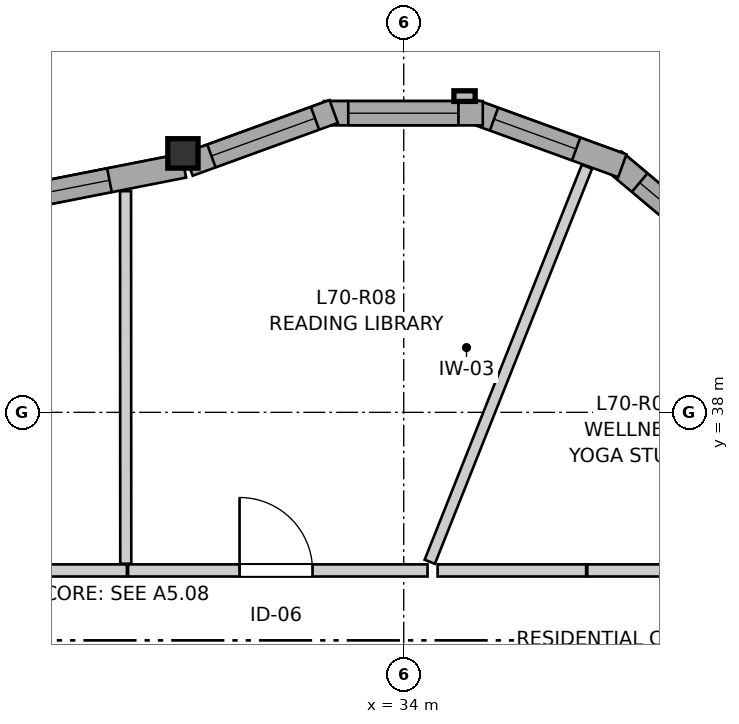
"""IFC4 building model, lengths in metres.
Left out: names, types, materials, properties, quantities, classifications, styles, units other than length and angle.
Written with IfcOpenShell. Run it as: python <this file> out.ifc"""

import sys

from ifc_helpers import new_model, si_unit, direction, frame, frame_2d, origin, origin_2d, place, context, subcontext, project, spatial, rectangle, i_section, extrude, source, transform, mapped, element, fill, save


model = new_model("IFC4")
c1 = context("Model", 3, precision=1e-05, world=origin(), true_north=direction((0.0, 1.0)))
c2 = subcontext(c1, "Body", "Model", "MODEL_VIEW")
j1 = project(units=[si_unit("LENGTHUNIT", "METRE"), si_unit("PLANEANGLEUNIT", "RADIAN")], contexts=[c1])
p1 = place(None, origin())
s1 = spatial("IfcSite", under=j1, at=p1, CompositionType="ELEMENT")
p2 = place(p1, origin())
s2 = spatial("IfcBuilding", under=s1, at=p2, CompositionType="ELEMENT")
p3 = place(p2, frame((0.0, 0.0, 234.0)))
s3 = spatial("IfcBuildingStorey", under=s2, at=p3, CompositionType="ELEMENT", Elevation=234.0)
m1 = source(origin(), c2, "Body", "SweptSolid", [
    extrude(i_section(OverallWidth=0.398, OverallDepth=0.387, WebThickness=0.019, FlangeThickness=0.03, FilletRadius=0.015, at=origin_2d()), origin(), (0.0, 0.0, 1.0), 2.96),
])
p4 = place(p3, frame((31.095, 41.406, 0.0), z_axis=(0.0, 0.0, 1.0), x_axis=(1.0, 0.0, 0.0)))
e1 = element("IfcColumn", 1, at=p4, inside=s3, PredefinedType="PILASTER", context=c2, shape_type="MappedRepresentation", body=[
    mapped(m1, transform((0.0, 0.0, 0.0), x_axis=(1.0, 0.0, 0.0), y_axis=(0.0, 1.0, 0.0), z_axis=(0.0, 0.0, 1.0), scale=1.0)),
])
p5 = place(p3, frame((38.365, 39.965, 0.0), z_axis=(0.0, 0.0, 1.0), x_axis=(-0.766072824549, 0.642753784499, 0.0)))
e2 = element("IfcWall", 2, at=p5, inside=s3, PredefinedType="SOLIDWALL", context=c2, shape_type="SweptSolid", body=[
    extrude(rectangle(XDim=2.091, YDim=0.32, at=frame_2d((1.045, 0.0))), origin(), (0.0, 0.0, 1.0), 2.58),
])
p6 = place(p5, frame((0.445, 0.0, 0.82)))
e3 = element("IfcOpeningElement", 3, at=p6, cuts=e2, PredefinedType="OPENING", context=c2, shape_type="SweptSolid", body=[
    extrude(rectangle(XDim=1.2, YDim=1.45, at=frame_2d((0.6, 0.725))), frame((0.0, 0.17, 0.0), z_axis=(0.0, -1.0, 0.0), x_axis=(1.0, 0.0, 0.0)), (0.0, 0.0, 1.0), 0.34),
])
p7 = place(p3, frame((36.876, 41.243, 0.0), z_axis=(0.0, 0.0, 1.0), x_axis=(-0.93973543134, 0.341902499383, 0.0)))
e4 = element("IfcWall", 4, at=p7, inside=s3, PredefinedType="SOLIDWALL", context=c2, shape_type="SweptSolid", body=[
    extrude(rectangle(XDim=2.09, YDim=0.32, at=frame_2d((1.045, 0.0))), origin(), (0.0, 0.0, 1.0), 2.58),
])
p8 = place(p7, frame((0.646, 0.0, 0.82)))
e5 = element("IfcOpeningElement", 5, at=p8, cuts=e4, PredefinedType="OPENING", context=c2, shape_type="SweptSolid", body=[
    extrude(rectangle(XDim=1.15, YDim=1.2, at=frame_2d((0.575, 0.6))), frame((0.0, 0.17, 0.0), z_axis=(0.0, -1.0, 0.0), x_axis=(1.0, 0.0, 0.0)), (0.0, 0.0, 1.0), 0.34),
])
p9 = place(p3, frame((35.04, 41.936, 0.0), z_axis=(0.0, 0.0, 1.0), x_axis=(-1.0, 0.0, 0.0)))
e6 = element("IfcWall", 6, at=p9, inside=s3, PredefinedType="SOLIDWALL", context=c2, shape_type="SweptSolid", body=[
    extrude(rectangle(XDim=2.091, YDim=0.32, at=frame_2d((1.045, 0.0))), origin(), (0.0, 0.0, 1.0), 2.58),
])
p10 = place(p9, frame((0.32, 0.0, 0.82)))
e7 = element("IfcOpeningElement", 7, at=p10, cuts=e6, PredefinedType="OPENING", context=c2, shape_type="SweptSolid", body=[
    extrude(rectangle(XDim=1.45, YDim=1.25, at=frame_2d((0.725, 0.625))), frame((0.0, 0.17, 0.0), z_axis=(0.0, -1.0, 0.0), x_axis=(1.0, 0.0, 0.0)), (0.0, 0.0, 1.0), 0.34),
])
p11 = place(p3, frame((33.078, 41.958, 0.0), z_axis=(0.0, 0.0, 1.0), x_axis=(-0.939730268502, -0.341916689358, 0.0)))
e8 = element("IfcWall", 8, at=p11, inside=s3, PredefinedType="SOLIDWALL", context=c2, shape_type="SweptSolid", body=[
    extrude(rectangle(XDim=2.032, YDim=0.32, at=frame_2d((1.016, 0.0))), origin(), (0.0, 0.0, 1.0), 2.58),
])
p12 = place(p11, frame((0.261, 0.0, 0.82)))
e9 = element("IfcOpeningElement", 9, at=p12, cuts=e8, PredefinedType="OPENING", context=c2, shape_type="SweptSolid", body=[
    extrude(rectangle(XDim=1.45, YDim=1.25, at=frame_2d((0.725, 0.625))), frame((0.0, 0.17, 0.0), z_axis=(0.0, -1.0, 0.0), x_axis=(1.0, 0.0, 0.0)), (0.0, 0.0, 1.0), 0.34),
])
p13 = place(p3, frame((31.106, 41.246, 0.0), z_axis=(0.0, 0.0, 1.0), x_axis=(-0.981245466498, -0.192762378272, 0.0)))
e10 = element("IfcWall", 10, at=p13, inside=s3, PredefinedType="SOLIDWALL", context=c2, shape_type="SweptSolid", body=[
    extrude(rectangle(XDim=2.213, YDim=0.32, at=frame_2d((1.106, 0.0))), origin(), (0.0, 0.0, 1.0), 2.58),
])
p14 = place(p13, frame((0.997, 0.0, 0.82)))
e11 = element("IfcOpeningElement", 11, at=p14, cuts=e10, PredefinedType="OPENING", context=c2, shape_type="SweptSolid", body=[
    extrude(rectangle(XDim=0.95, YDim=1.35, at=frame_2d((0.475, 0.675))), frame((0.0, 0.17, 0.0), z_axis=(0.0, -1.0, 0.0), x_axis=(1.0, 0.0, 0.0)), (0.0, 0.0, 1.0), 0.34),
])
p15 = place(p3, frame((24.3, 35.92, 0.0), z_axis=(0.0, 0.0, 1.0), x_axis=(1.0, 0.0, 0.0)))
e12 = element("IfcWall", 12, at=p15, inside=s3, PredefinedType="PARTITIONING", context=c2, shape_type="SweptSolid", body=[
    extrude(rectangle(XDim=6.058, YDim=0.16, at=frame_2d((3.029, 0.0))), origin(), (0.0, 0.0, 1.0), 2.96),
])
p16 = place(p15, frame((2.542, 0.0, 0.0)))
e13 = element("IfcOpeningElement", 13, at=p16, cuts=e12, PredefinedType="OPENING", context=c2, shape_type="SweptSolid", body=[
    extrude(rectangle(XDim=0.96, YDim=2.1, at=frame_2d((0.48, 1.05))), frame((0.0, 0.09, 0.0), z_axis=(0.0, -1.0, 0.0), x_axis=(1.0, 0.0, 0.0)), (0.0, 0.0, 1.0), 0.18),
])
p17 = place(p3, frame((30.373, 35.92, 0.0), z_axis=(0.0, 0.0, 1.0), x_axis=(1.0, 0.0, 0.0)))
e14 = element("IfcWall", 14, at=p17, inside=s3, PredefinedType="PARTITIONING", context=c2, shape_type="SweptSolid", body=[
    extrude(rectangle(XDim=3.94, YDim=0.16, at=frame_2d((1.97, 0.0))), origin(), (0.0, 0.0, 1.0), 2.96),
])
p18 = place(p17, frame((1.467, 0.0, 0.0)))
e15 = element("IfcOpeningElement", 15, at=p18, cuts=e14, PredefinedType="OPENING", context=c2, shape_type="SweptSolid", body=[
    extrude(rectangle(XDim=0.96, YDim=2.1, at=frame_2d((0.48, 1.05))), frame((0.0, 0.09, 0.0), z_axis=(0.0, -1.0, 0.0), x_axis=(1.0, 0.0, 0.0)), (0.0, 0.0, 1.0), 0.18),
])
p19 = place(p3, frame((34.343, 36.034, 0.0), z_axis=(0.0, 0.0, 1.0), x_axis=(0.369712016487, 0.92914639582, 0.0)))
e16 = element("IfcWall", 16, at=p19, inside=s3, PredefinedType="PARTITIONING", context=c2, shape_type="SweptSolid", body=[
    extrude(rectangle(XDim=5.594, YDim=0.145, at=frame_2d((2.797, 0.0))), origin(), (0.0, 0.0, 1.0), 2.96),
])
p20 = place(p3, frame((30.34, 40.91, 0.0), z_axis=(0.0, 0.0, 1.0), x_axis=(0.000597668984, -0.999999821396, 0.0)))
e17 = element("IfcWall", 17, at=p20, inside=s3, PredefinedType="PARTITIONING", context=c2, shape_type="SweptSolid", body=[
    extrude(rectangle(XDim=4.902, YDim=0.145, at=frame_2d((2.451, 0.0))), origin(), (0.0, 0.0, 1.0), 2.96),
])
p21 = place(p3, frame((34.446, 35.92, 0.0), z_axis=(0.0, 0.0, 1.0), x_axis=(1.0, 0.0, 0.0)))
e18 = element("IfcWall", 18, at=p21, inside=s3, PredefinedType="PARTITIONING", context=c2, shape_type="SweptSolid", body=[
    extrude(rectangle(XDim=1.954, YDim=0.16, at=frame_2d((0.977, 0.0))), origin(), (0.0, 0.0, 1.0), 2.598),
])
p22 = place(p3, frame((36.415, 35.92, 0.0), z_axis=(0.0, 0.0, 1.0), x_axis=(1.0, 0.0, 0.0)))
e19 = element("IfcWall", 19, at=p22, inside=s3, PredefinedType="PARTITIONING", context=c2, shape_type="SweptSolid", body=[
    extrude(rectangle(XDim=1.605, YDim=0.16, at=frame_2d((0.802, 0.0))), origin(), (0.0, 0.0, 1.0), 2.598),
])
m2 = source(origin(), c2, "Body", "SweptSolid", [
    extrude(rectangle(XDim=1.2, YDim=1.45, at=frame_2d((0.6, 0.725))), frame((0.0, 0.03, 0.0), z_axis=(0.0, -1.0, 0.0), x_axis=(1.0, 0.0, 0.0)), (0.0, 0.0, 1.0), 0.06),
])
p23 = place(p6, origin())
e20 = element("IfcWindow", 20, at=p23, inside=s3, PartitioningType="SINGLE_PANEL", PredefinedType="WINDOW", context=c2, shape_type="MappedRepresentation", body=[
    mapped(m2, transform((0.0, 0.0, 0.0), x_axis=(1.0, 0.0, 0.0), y_axis=(0.0, 1.0, 0.0), z_axis=(0.0, 0.0, 1.0), scale=1.0)),
])
fill(e3, e20)
m3 = source(origin(), c2, "Body", "SweptSolid", [
    extrude(rectangle(XDim=1.15, YDim=1.2, at=frame_2d((0.575, 0.6))), frame((0.0, 0.03, 0.0), z_axis=(0.0, -1.0, 0.0), x_axis=(1.0, 0.0, 0.0)), (0.0, 0.0, 1.0), 0.06),
])
p24 = place(p8, origin())
e21 = element("IfcWindow", 21, at=p24, inside=s3, PartitioningType="SINGLE_PANEL", PredefinedType="WINDOW", context=c2, shape_type="MappedRepresentation", body=[
    mapped(m3, transform((0.0, 0.0, 0.0), x_axis=(1.0, 0.0, 0.0), y_axis=(0.0, 1.0, 0.0), z_axis=(0.0, 0.0, 1.0), scale=1.0)),
])
fill(e5, e21)
m4 = source(origin(), c2, "Body", "SweptSolid", [
    extrude(rectangle(XDim=1.45, YDim=1.25, at=frame_2d((0.725, 0.625))), frame((0.0, 0.03, 0.0), z_axis=(0.0, -1.0, 0.0), x_axis=(1.0, 0.0, 0.0)), (0.0, 0.0, 1.0), 0.06),
])
p25 = place(p10, origin())
e22 = element("IfcWindow", 22, at=p25, inside=s3, PartitioningType="SINGLE_PANEL", PredefinedType="WINDOW", context=c2, shape_type="MappedRepresentation", body=[
    mapped(m4, transform((0.0, 0.0, 0.0), x_axis=(1.0, 0.0, 0.0), y_axis=(0.0, 1.0, 0.0), z_axis=(0.0, 0.0, 1.0), scale=1.0)),
])
fill(e7, e22)
p26 = place(p12, origin())
e23 = element("IfcWindow", 23, at=p26, inside=s3, PartitioningType="SINGLE_PANEL", PredefinedType="WINDOW", context=c2, shape_type="MappedRepresentation", body=[
    mapped(m4, transform((0.0, 0.0, 0.0), x_axis=(1.0, 0.0, 0.0), y_axis=(0.0, 1.0, 0.0), z_axis=(0.0, 0.0, 1.0), scale=1.0)),
])
fill(e9, e23)
m5 = source(origin(), c2, "Body", "SweptSolid", [
    extrude(rectangle(XDim=0.95, YDim=1.35, at=frame_2d((0.475, 0.675))), frame((0.0, 0.03, 0.0), z_axis=(0.0, -1.0, 0.0), x_axis=(1.0, 0.0, 0.0)), (0.0, 0.0, 1.0), 0.06),
])
p27 = place(p14, origin())
e24 = element("IfcWindow", 24, at=p27, inside=s3, PartitioningType="SINGLE_PANEL", PredefinedType="WINDOW", context=c2, shape_type="MappedRepresentation", body=[
    mapped(m5, transform((0.0, 0.0, 0.0), x_axis=(1.0, 0.0, 0.0), y_axis=(0.0, 1.0, 0.0), z_axis=(0.0, 0.0, 1.0), scale=1.0)),
])
fill(e11, e24)
m6 = source(origin(), c2, "Body", "SweptSolid", [
    extrude(rectangle(XDim=0.96, YDim=2.1, at=frame_2d((0.48, 1.05))), frame((0.0, 0.025, 0.0), z_axis=(0.0, -1.0, 0.0), x_axis=(1.0, 0.0, 0.0)), (0.0, 0.0, 1.0), 0.05),
])
p28 = place(p18, origin())
e25 = element("IfcDoor", 25, at=p28, inside=s3, OperationType="SINGLE_SWING_LEFT", PredefinedType="DOOR", context=c2, shape_type="MappedRepresentation", body=[
    mapped(m6, transform((0.0, 0.0, 0.0), x_axis=(1.0, 0.0, 0.0), y_axis=(0.0, 1.0, 0.0), z_axis=(0.0, 0.0, 1.0), scale=1.0)),
])
fill(e15, e25)
save(model, sys.argv[1])
